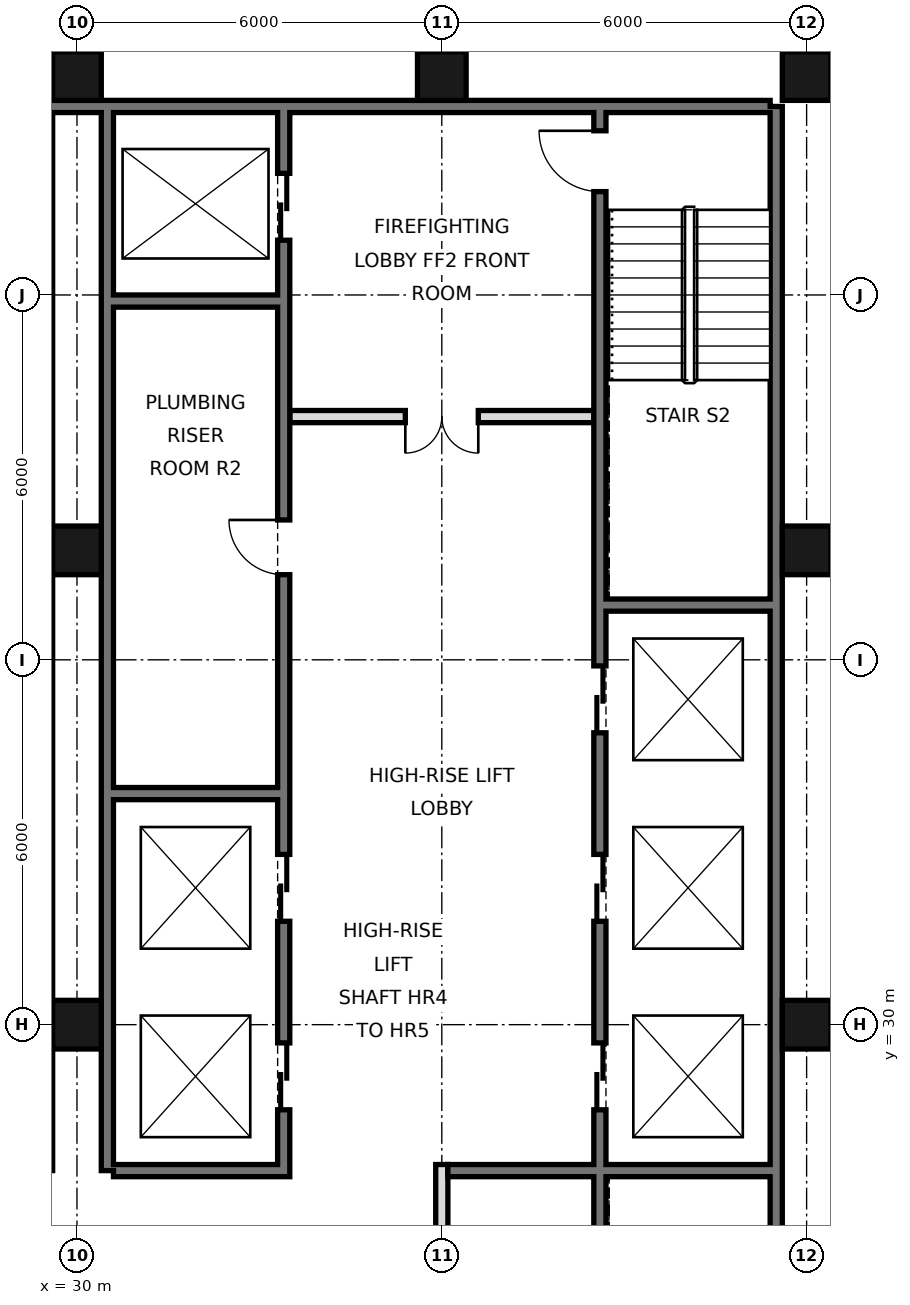
"""IFC4 building model, lengths in metres.
Left out: names, types, materials, properties, quantities, classifications, styles, units other than length and angle.
Written with IfcOpenShell. Run it as: python <this file> out.ifc"""

import sys

from ifc_helpers import new_model, si_unit, direction, frame, frame_2d, origin, origin_2d, place, context, subcontext, project, spatial, rectangle, hollow_rectangle, extrude, element, fill, save


model = new_model("IFC4")
c1 = context("Model", 3, precision=1e-05, world=origin(), true_north=direction((0.0, 1.0)))
c2 = subcontext(c1, "Body", "Model", "MODEL_VIEW")
j1 = project(units=[si_unit("LENGTHUNIT", "METRE"), si_unit("PLANEANGLEUNIT", "RADIAN")], contexts=[c1])
p1 = place(None, origin())
s1 = spatial("IfcSite", under=j1, at=p1, CompositionType="ELEMENT")
p2 = place(p1, origin())
s2 = spatial("IfcBuilding", under=s1, at=p2, CompositionType="ELEMENT")
p3 = place(p2, frame((0.0, 0.0, 215.4)))
s3 = spatial("IfcBuildingStorey", under=s2, at=p3, CompositionType="ELEMENT", Elevation=215.4)
for number, where, z_axis, x_axis in (
    (1, (30.0, 30.0, 0.0), (0.0, 0.0, 1.0), (1.0, 0.0, 0.0)),
    (2, (30.0, 37.8, 0.0), (0.0, 0.0, 1.0), (1.0, 0.0, 0.0)),
    (3, (30.0, 45.6, 0.0), (0.0, 0.0, 1.0), (1.0, 0.0, 0.0)),
    (4, (36.0, 45.6, 0.0), (0.0, 0.0, 1.0), (1.0, 0.0, 0.0)),
    (5, (42.0, 30.0, 0.0), (0.0, 0.0, 1.0), (1.0, 0.0, 0.0)),
    (6, (42.0, 37.8, 0.0), (0.0, 0.0, 1.0), (1.0, 0.0, 0.0)),
    (7, (42.0, 45.6, 0.0), (0.0, 0.0, 1.0), (1.0, 0.0, 0.0)),
):
    element("IfcColumn", number, at=place(p3, frame(where, z_axis=z_axis, x_axis=x_axis)), inside=s3, PredefinedType="COLUMN", context=c2, shape_type="SweptSolid", body=[
        extrude(hollow_rectangle(XDim=0.8, YDim=0.8, WallThickness=0.04, at=origin_2d()), origin(), (0.0, 0.0, 1.0), 3.6),
    ])
p4 = place(p3, frame((41.5, 21.6, 0.0), z_axis=(0.0, 0.0, 1.0), x_axis=(0.0, 1.0, 0.0)))
e8 = element("IfcWall", 8, at=p4, inside=s3, PredefinedType="SOLIDWALL", context=c2, shape_type="SweptSolid", body=[
    extrude(rectangle(XDim=23.5, YDim=0.2, at=frame_2d((11.75, 0.0))), origin(), (0.0, 0.0, 1.0), 3.42),
])
p5 = place(p3, frame((6.6, 45.1, 0.0), z_axis=(0.0, 0.0, 1.0), x_axis=(1.0, 0.0, 0.0)))
e9 = element("IfcWall", 9, at=p5, inside=s3, PredefinedType="SOLIDWALL", context=c2, shape_type="SweptSolid", body=[
    extrude(rectangle(XDim=34.8, YDim=0.2, at=frame_2d((17.4, 0.0))), origin(), (0.0, 0.0, 1.0), 3.42),
])
p6 = place(p3, frame((30.5, 27.6, 0.0), z_axis=(0.0, 0.0, 1.0), x_axis=(0.0, 1.0, 0.0)))
e10 = element("IfcWall", 10, at=p6, inside=s3, PredefinedType="SOLIDWALL", context=c2, shape_type="SweptSolid", body=[
    extrude(rectangle(XDim=17.5, YDim=0.2, at=frame_2d((8.75, 0.0))), origin(), (0.0, 0.0, 1.0), 3.42),
])
p7 = place(p3, frame((33.4, 27.5, 0.0), z_axis=(0.0, 0.0, 1.0), x_axis=(0.0, 1.0, 0.0)))
e11 = element("IfcWall", 11, at=p7, inside=s3, PredefinedType="SOLIDWALL", context=c2, shape_type="SweptSolid", body=[
    extrude(rectangle(XDim=17.5, YDim=0.2, at=frame_2d((8.75, 0.0))), origin(), (0.0, 0.0, 1.0), 3.42),
])
p8 = place(p7, frame((1.1, 0.0, 0.0)))
e12 = element("IfcOpeningElement", 12, at=p8, cuts=e11, PredefinedType="OPENING", context=c2, shape_type="SweptSolid", body=[
    extrude(rectangle(XDim=1.1, YDim=2.1, at=frame_2d((0.55, 1.05))), frame((0.0, 0.11, 0.0), z_axis=(0.0, -1.0, 0.0), x_axis=(1.0, 0.0, 0.0)), (0.0, 0.0, 1.0), 0.22),
])
p9 = place(p7, frame((4.2, 0.0, 0.0)))
e13 = element("IfcOpeningElement", 13, at=p9, cuts=e11, PredefinedType="OPENING", context=c2, shape_type="SweptSolid", body=[
    extrude(rectangle(XDim=1.1, YDim=2.1, at=frame_2d((0.55, 1.05))), frame((0.0, 0.11, 0.0), z_axis=(0.0, -1.0, 0.0), x_axis=(1.0, 0.0, 0.0)), (0.0, 0.0, 1.0), 0.22),
])
p10 = place(p7, frame((15.4, 0.0, 0.0)))
e14 = element("IfcOpeningElement", 14, at=p10, cuts=e11, PredefinedType="OPENING", context=c2, shape_type="SweptSolid", body=[
    extrude(rectangle(XDim=1.1, YDim=2.1, at=frame_2d((0.55, 1.05))), frame((0.0, 0.11, 0.0), z_axis=(0.0, -1.0, 0.0), x_axis=(1.0, 0.0, 0.0)), (0.0, 0.0, 1.0), 0.22),
])
p11 = place(p7, frame((9.9, 0.0, 0.0)))
e15 = element("IfcOpeningElement", 15, at=p11, cuts=e11, PredefinedType="OPENING", context=c2, shape_type="SweptSolid", body=[
    extrude(rectangle(XDim=0.9, YDim=2.1, at=frame_2d((0.45, 1.05))), frame((0.0, 0.11, 0.0), z_axis=(0.0, -1.0, 0.0), x_axis=(1.0, 0.0, 0.0)), (0.0, 0.0, 1.0), 0.22),
])
p12 = place(p3, frame((36.0, 21.6, 0.0), z_axis=(0.0, 0.0, 1.0), x_axis=(0.0, 1.0, 0.0)))
e16 = element("IfcWall", 16, at=p12, inside=s3, PredefinedType="PARTITIONING", context=c2, shape_type="SweptSolid", body=[
    extrude(rectangle(XDim=6.1, YDim=0.2, at=frame_2d((3.05, 0.0))), origin(), (0.0, 0.0, 1.0), 3.42),
])
p13 = place(p3, frame((38.6, 21.6, 0.0), z_axis=(0.0, 0.0, 1.0), x_axis=(0.0, 1.0, 0.0)))
e17 = element("IfcWall", 17, at=p13, inside=s3, PredefinedType="SOLIDWALL", context=c2, shape_type="SweptSolid", body=[
    extrude(rectangle(XDim=23.4, YDim=0.2, at=frame_2d((11.7, 0.0))), origin(), (0.0, 0.0, 1.0), 3.42),
])
p14 = place(p13, frame((7.0, 0.0, 0.0)))
e18 = element("IfcOpeningElement", 18, at=p14, cuts=e17, PredefinedType="OPENING", context=c2, shape_type="SweptSolid", body=[
    extrude(rectangle(XDim=1.1, YDim=2.1, at=frame_2d((0.55, 1.05))), frame((0.0, 0.11, 0.0), z_axis=(0.0, -1.0, 0.0), x_axis=(1.0, 0.0, 0.0)), (0.0, 0.0, 1.0), 0.22),
])
p15 = place(p13, frame((10.1, 0.0, 0.0)))
e19 = element("IfcOpeningElement", 19, at=p15, cuts=e17, PredefinedType="OPENING", context=c2, shape_type="SweptSolid", body=[
    extrude(rectangle(XDim=1.1, YDim=2.1, at=frame_2d((0.55, 1.05))), frame((0.0, 0.11, 0.0), z_axis=(0.0, -1.0, 0.0), x_axis=(1.0, 0.0, 0.0)), (0.0, 0.0, 1.0), 0.22),
])
p16 = place(p13, frame((13.2, 0.0, 0.0)))
e20 = element("IfcOpeningElement", 20, at=p16, cuts=e17, PredefinedType="OPENING", context=c2, shape_type="SweptSolid", body=[
    extrude(rectangle(XDim=1.1, YDim=2.1, at=frame_2d((0.55, 1.05))), frame((0.0, 0.11, 0.0), z_axis=(0.0, -1.0, 0.0), x_axis=(1.0, 0.0, 0.0)), (0.0, 0.0, 1.0), 0.22),
])
p17 = place(p13, frame((22.1, 0.0, 0.0)))
e21 = element("IfcOpeningElement", 21, at=p17, cuts=e17, PredefinedType="OPENING", context=c2, shape_type="SweptSolid", body=[
    extrude(rectangle(XDim=1.0, YDim=2.1, at=frame_2d((0.5, 1.05))), frame((0.0, 0.11, 0.0), z_axis=(0.0, -1.0, 0.0), x_axis=(1.0, 0.0, 0.0)), (0.0, 0.0, 1.0), 0.22),
])
p18 = place(p13, frame((0.175, 0.0, 0.0)))
e22 = element("IfcOpeningElement", 22, at=p18, cuts=e17, PredefinedType="OPENING", context=c2, shape_type="SweptSolid", body=[
    extrude(rectangle(XDim=0.9, YDim=2.1, at=frame_2d((0.45, 1.05))), frame((0.0, 0.11, 0.0), z_axis=(0.0, -1.0, 0.0), x_axis=(1.0, 0.0, 0.0)), (0.0, 0.0, 1.0), 0.22),
])
p19 = place(p3, frame((30.6, 27.6, 0.0), z_axis=(0.0, 0.0, 1.0), x_axis=(1.0, 0.0, 0.0)))
e23 = element("IfcWall", 23, at=p19, inside=s3, PredefinedType="SOLIDWALL", context=c2, shape_type="SweptSolid", body=[
    extrude(rectangle(XDim=2.7, YDim=0.2, at=frame_2d((1.35, 0.0))), origin(), (0.0, 0.0, 1.0), 3.42),
])
p20 = place(p3, frame((36.1, 27.6, 0.0), z_axis=(0.0, 0.0, 1.0), x_axis=(1.0, 0.0, 0.0)))
e24 = element("IfcWall", 24, at=p20, inside=s3, PredefinedType="SOLIDWALL", context=c2, shape_type="SweptSolid", body=[
    extrude(rectangle(XDim=5.3, YDim=0.2, at=frame_2d((2.65, 0.0))), origin(), (0.0, 0.0, 1.0), 3.42),
])
for number, where, z_axis, x_axis in (
    (25, (30.6, 33.8, 0.0), (0.0, 0.0, 1.0), (1.0, 0.0, 0.0)),
    (26, (38.7, 36.9, 0.0), (0.0, 0.0, 1.0), (1.0, 0.0, 0.0)),
):
    element("IfcWall", number, at=place(p3, frame(where, z_axis=z_axis, x_axis=x_axis)), inside=s3, PredefinedType="SOLIDWALL", context=c2, shape_type="SweptSolid", body=[
        extrude(rectangle(XDim=2.7, YDim=0.2, at=frame_2d((1.35, 0.0))), origin(), (0.0, 0.0, 1.0), 3.42),
    ])
p21 = place(p3, frame((33.5, 40.0, 0.0), z_axis=(0.0, 0.0, 1.0), x_axis=(1.0, 0.0, 0.0)))
e27 = element("IfcWall", 27, at=p21, inside=s3, PredefinedType="PARTITIONING", context=c2, shape_type="SweptSolid", body=[
    extrude(rectangle(XDim=5.0, YDim=0.2, at=frame_2d((2.5, 0.0))), origin(), (0.0, 0.0, 1.0), 3.42),
])
p22 = place(p21, frame((1.9, 0.0, 0.0)))
e28 = element("IfcOpeningElement", 28, at=p22, cuts=e27, PredefinedType="OPENING", context=c2, shape_type="SweptSolid", body=[
    extrude(rectangle(XDim=1.2, YDim=2.1, at=frame_2d((0.6, 1.05))), frame((0.0, 0.11, 0.0), z_axis=(0.0, -1.0, 0.0), x_axis=(1.0, 0.0, 0.0)), (0.0, 0.0, 1.0), 0.22),
])
p23 = place(p3, frame((30.6, 41.9, 0.0), z_axis=(0.0, 0.0, 1.0), x_axis=(1.0, 0.0, 0.0)))
e29 = element("IfcWall", 29, at=p23, inside=s3, PredefinedType="SOLIDWALL", context=c2, shape_type="SweptSolid", body=[
    extrude(rectangle(XDim=2.7, YDim=0.2, at=frame_2d((1.35, 0.0))), origin(), (0.0, 0.0, 1.0), 3.42),
])
p24 = place(p22, frame((1.2, 0.0, 0.0), z_axis=(0.0, 0.0, 1.0), x_axis=(-1.0, 0.0, 0.0)))
e30 = element("IfcDoor", 30, at=p24, inside=s3, OperationType="DOUBLE_DOOR_SINGLE_SWING", PredefinedType="DOOR", context=c2, shape_type="SweptSolid", body=[
    extrude(rectangle(XDim=1.2, YDim=2.1, at=frame_2d((0.6, 1.05))), frame((0.0, 0.025, 0.0), z_axis=(0.0, -1.0, 0.0), x_axis=(1.0, 0.0, 0.0)), (0.0, 0.0, 1.0), 0.05),
])
fill(e28, e30)
p25 = place(p14, origin())
e31 = element("IfcDoor", 31, at=p25, inside=s3, OperationType="DOUBLE_DOOR_SLIDING", PredefinedType="DOOR", context=c2, shape_type="SweptSolid", body=[
    extrude(rectangle(XDim=1.1, YDim=2.1, at=frame_2d((0.55, 1.05))), frame((0.0, 0.025, 0.0), z_axis=(0.0, -1.0, 0.0), x_axis=(1.0, 0.0, 0.0)), (0.0, 0.0, 1.0), 0.05),
])
fill(e18, e31)
p26 = place(p15, origin())
e32 = element("IfcDoor", 32, at=p26, inside=s3, OperationType="DOUBLE_DOOR_SLIDING", PredefinedType="DOOR", context=c2, shape_type="SweptSolid", body=[
    extrude(rectangle(XDim=1.1, YDim=2.1, at=frame_2d((0.55, 1.05))), frame((0.0, 0.025, 0.0), z_axis=(0.0, -1.0, 0.0), x_axis=(1.0, 0.0, 0.0)), (0.0, 0.0, 1.0), 0.05),
])
fill(e19, e32)
p27 = place(p16, origin())
e33 = element("IfcDoor", 33, at=p27, inside=s3, OperationType="DOUBLE_DOOR_SLIDING", PredefinedType="DOOR", context=c2, shape_type="SweptSolid", body=[
    extrude(rectangle(XDim=1.1, YDim=2.1, at=frame_2d((0.55, 1.05))), frame((0.0, 0.025, 0.0), z_axis=(0.0, -1.0, 0.0), x_axis=(1.0, 0.0, 0.0)), (0.0, 0.0, 1.0), 0.05),
])
fill(e20, e33)
p28 = place(p8, origin())
e34 = element("IfcDoor", 34, at=p28, inside=s3, OperationType="DOUBLE_DOOR_SLIDING", PredefinedType="DOOR", context=c2, shape_type="SweptSolid", body=[
    extrude(rectangle(XDim=1.1, YDim=2.1, at=frame_2d((0.55, 1.05))), frame((0.0, 0.025, 0.0), z_axis=(0.0, -1.0, 0.0), x_axis=(1.0, 0.0, 0.0)), (0.0, 0.0, 1.0), 0.05),
])
fill(e12, e34)
p29 = place(p9, origin())
e35 = element("IfcDoor", 35, at=p29, inside=s3, OperationType="DOUBLE_DOOR_SLIDING", PredefinedType="DOOR", context=c2, shape_type="SweptSolid", body=[
    extrude(rectangle(XDim=1.1, YDim=2.1, at=frame_2d((0.55, 1.05))), frame((0.0, 0.025, 0.0), z_axis=(0.0, -1.0, 0.0), x_axis=(1.0, 0.0, 0.0)), (0.0, 0.0, 1.0), 0.05),
])
fill(e13, e35)
p30 = place(p10, origin())
e36 = element("IfcDoor", 36, at=p30, inside=s3, OperationType="DOUBLE_DOOR_SLIDING", PredefinedType="DOOR", context=c2, shape_type="SweptSolid", body=[
    extrude(rectangle(XDim=1.1, YDim=2.1, at=frame_2d((0.55, 1.05))), frame((0.0, 0.025, 0.0), z_axis=(0.0, -1.0, 0.0), x_axis=(1.0, 0.0, 0.0)), (0.0, 0.0, 1.0), 0.05),
])
fill(e14, e36)
p31 = place(p17, frame((1.0, 0.0, 0.0), z_axis=(0.0, 0.0, 1.0), x_axis=(-1.0, 0.0, 0.0)))
e37 = element("IfcDoor", 37, at=p31, inside=s3, OperationType="SINGLE_SWING_LEFT", PredefinedType="DOOR", context=c2, shape_type="SweptSolid", body=[
    extrude(rectangle(XDim=1.0, YDim=2.1, at=frame_2d((0.5, 1.05))), frame((0.0, 0.025, 0.0), z_axis=(0.0, -1.0, 0.0), x_axis=(1.0, 0.0, 0.0)), (0.0, 0.0, 1.0), 0.05),
])
fill(e21, e37)
p32 = place(p11, frame((0.9, 0.0, 0.0), z_axis=(0.0, 0.0, 1.0), x_axis=(-1.0, 0.0, 0.0)))
e38 = element("IfcDoor", 38, at=p32, inside=s3, OperationType="SINGLE_SWING_LEFT", PredefinedType="DOOR", context=c2, shape_type="SweptSolid", body=[
    extrude(rectangle(XDim=0.9, YDim=2.1, at=frame_2d((0.45, 1.05))), frame((0.0, 0.025, 0.0), z_axis=(0.0, -1.0, 0.0), x_axis=(1.0, 0.0, 0.0)), (0.0, 0.0, 1.0), 0.05),
])
fill(e15, e38)
save(model, sys.argv[1])
